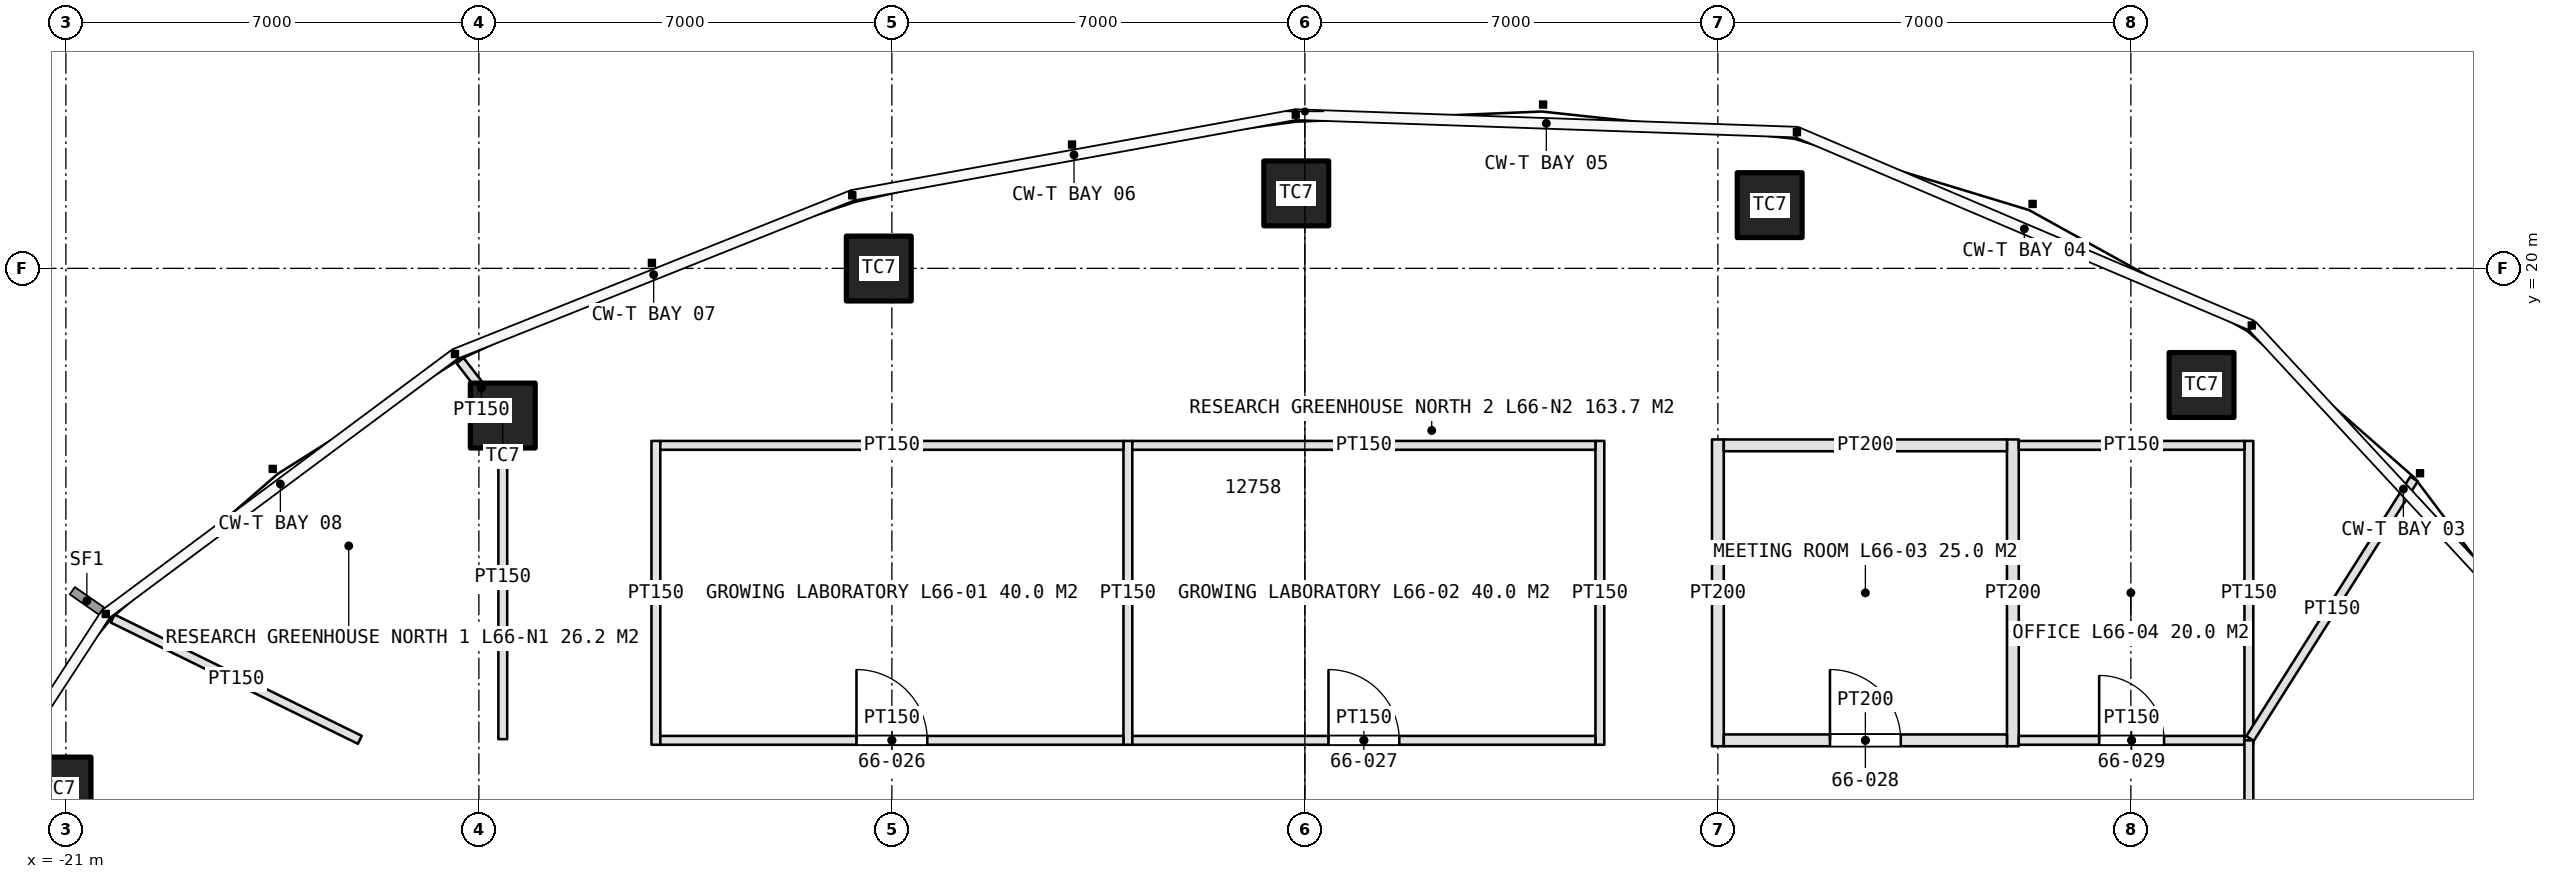
"""IFC4 building model, lengths in metres.
Left out: names, types, materials, properties, quantities, classifications, styles, units other than length and angle.
Written with IfcOpenShell. Run it as: python <this file> out.ifc"""

import sys

from ifc_helpers import new_model, si_unit, direction, frame, frame_2d, origin, origin_2d, place, context, subcontext, project, spatial, rectangle, extrude, element, fill, save


model = new_model("IFC4")
c1 = context("Model", 3, precision=1e-05, world=origin(), true_north=direction((0.0, 1.0)))
c2 = subcontext(c1, "Body", "Model", "MODEL_VIEW")
j1 = project(units=[si_unit("LENGTHUNIT", "METRE"), si_unit("PLANEANGLEUNIT", "RADIAN")], contexts=[c1])
p1 = place(None, origin())
s1 = spatial("IfcSite", under=j1, at=p1, CompositionType="ELEMENT")
p2 = place(p1, origin())
s2 = spatial("IfcBuilding", under=s1, at=p2, CompositionType="ELEMENT")
p3 = place(p2, frame((0.0, 0.0, 296.4)))
s3 = spatial("IfcBuildingStorey", under=s2, at=p3, CompositionType="ELEMENT", Elevation=296.4)
for number, where, z_axis, x_axis in (
    (1, (15.198, 18.023, 0.0), (0.0, 0.0, 1.0), (1.0, 0.0, 0.0)),
    (2, (7.878, 21.072, 0.0), (0.0, 0.0, 1.0), (1.0, 0.0, 0.0)),
    (3, (-0.146, 21.271, 0.0), (0.0, 0.0, 1.0), (1.0, 0.0, 0.0)),
    (4, (-7.222, 19.997, 0.0), (0.0, 0.0, 1.0), (1.0, 0.0, 0.0)),
    (5, (-13.595, 17.505, 0.0), (0.0, 0.0, 1.0), (1.0, 0.0, 0.0)),
    (6, (-21.125, 11.166, 0.0), (0.0, 0.0, 1.0), (1.0, 0.0, 0.0)),
):
    element("IfcColumn", number, at=place(p3, frame(where, z_axis=z_axis, x_axis=x_axis)), inside=s3, PredefinedType="COLUMN", context=c2, shape_type="SweptSolid", body=[
        extrude(rectangle(XDim=1.1, YDim=1.1, at=origin_2d()), origin(), (0.0, 0.0, 1.0), 4.2),
    ])
for number, where, z_axis, x_axis in (
    (7, (-11.0, 11.925, 0.0), (0.0, 0.0, 1.0), (0.0, 1.0, 0.0)),
    (8, (-3.0, 11.925, 0.0), (0.0, 0.0, 1.0), (0.0, 1.0, 0.0)),
    (9, (5.0, 11.925, 0.0), (0.0, 0.0, 1.0), (0.0, 1.0, 0.0)),
):
    element("IfcWall", number, at=place(p3, frame(where, z_axis=z_axis, x_axis=x_axis)), inside=s3, PredefinedType="PARTITIONING", context=c2, shape_type="SweptSolid", body=[
        extrude(rectangle(XDim=5.15, YDim=0.15, at=frame_2d((2.575, 0.0))), origin(), (0.0, 0.0, 1.0), 3.0),
    ])
p4 = place(p3, frame((-10.925, 12.0, 0.0), z_axis=(0.0, 0.0, 1.0), x_axis=(1.0, 0.0, 0.0)))
e10 = element("IfcWall", 10, at=p4, inside=s3, PredefinedType="PARTITIONING", context=c2, shape_type="SweptSolid", body=[
    extrude(rectangle(XDim=7.85, YDim=0.15, at=frame_2d((3.925, 0.0))), origin(), (0.0, 0.0, 1.0), 3.0),
])
p5 = place(p4, frame((3.325, 0.0, 0.0)))
e11 = element("IfcOpeningElement", 11, at=p5, cuts=e10, PredefinedType="OPENING", context=c2, shape_type="SweptSolid", body=[
    extrude(rectangle(XDim=1.2, YDim=2.3, at=frame_2d((0.6, 1.15))), frame((0.0, 0.085, 0.0), z_axis=(0.0, -1.0, 0.0), x_axis=(1.0, 0.0, 0.0)), (0.0, 0.0, 1.0), 0.17),
])
p6 = place(p3, frame((-10.925, 17.0, 0.0), z_axis=(0.0, 0.0, 1.0), x_axis=(1.0, 0.0, 0.0)))
e12 = element("IfcWall", 12, at=p6, inside=s3, PredefinedType="PARTITIONING", context=c2, shape_type="SweptSolid", body=[
    extrude(rectangle(XDim=7.85, YDim=0.15, at=frame_2d((3.925, 0.0))), origin(), (0.0, 0.0, 1.0), 3.0),
])
p7 = place(p3, frame((-2.925, 12.0, 0.0), z_axis=(0.0, 0.0, 1.0), x_axis=(1.0, 0.0, 0.0)))
e13 = element("IfcWall", 13, at=p7, inside=s3, PredefinedType="PARTITIONING", context=c2, shape_type="SweptSolid", body=[
    extrude(rectangle(XDim=7.85, YDim=0.15, at=frame_2d((3.925, 0.0))), origin(), (0.0, 0.0, 1.0), 3.0),
])
p8 = place(p7, frame((3.325, 0.0, 0.0)))
e14 = element("IfcOpeningElement", 14, at=p8, cuts=e13, PredefinedType="OPENING", context=c2, shape_type="SweptSolid", body=[
    extrude(rectangle(XDim=1.2, YDim=2.3, at=frame_2d((0.6, 1.15))), frame((0.0, 0.085, 0.0), z_axis=(0.0, -1.0, 0.0), x_axis=(1.0, 0.0, 0.0)), (0.0, 0.0, 1.0), 0.17),
])
p9 = place(p3, frame((-2.925, 17.0, 0.0), z_axis=(0.0, 0.0, 1.0), x_axis=(1.0, 0.0, 0.0)))
e15 = element("IfcWall", 15, at=p9, inside=s3, PredefinedType="PARTITIONING", context=c2, shape_type="SweptSolid", body=[
    extrude(rectangle(XDim=7.85, YDim=0.15, at=frame_2d((3.925, 0.0))), origin(), (0.0, 0.0, 1.0), 3.0),
])
for number, where, z_axis, x_axis in (
    (16, (7.0, 11.9, 0.0), (0.0, 0.0, 1.0), (0.0, 1.0, 0.0)),
    (17, (12.0, 11.9, 0.0), (0.0, 0.0, 1.0), (0.0, 1.0, 0.0)),
):
    element("IfcWall", number, at=place(p3, frame(where, z_axis=z_axis, x_axis=x_axis)), inside=s3, PredefinedType="PARTITIONING", context=c2, shape_type="SweptSolid", body=[
        extrude(rectangle(XDim=5.2, YDim=0.2, at=frame_2d((2.6, 0.0))), origin(), (0.0, 0.0, 1.0), 3.0),
    ])
p10 = place(p3, frame((16.0, 11.925, 0.0), z_axis=(0.0, 0.0, 1.0), x_axis=(0.0, 1.0, 0.0)))
e18 = element("IfcWall", 18, at=p10, inside=s3, PredefinedType="PARTITIONING", context=c2, shape_type="SweptSolid", body=[
    extrude(rectangle(XDim=5.15, YDim=0.15, at=frame_2d((2.575, 0.0))), origin(), (0.0, 0.0, 1.0), 3.0),
])
p11 = place(p3, frame((7.1, 12.0, 0.0), z_axis=(0.0, 0.0, 1.0), x_axis=(1.0, 0.0, 0.0)))
e19 = element("IfcWall", 19, at=p11, inside=s3, PredefinedType="PARTITIONING", context=c2, shape_type="SweptSolid", body=[
    extrude(rectangle(XDim=4.8, YDim=0.2, at=frame_2d((2.4, 0.0))), origin(), (0.0, 0.0, 1.0), 3.0),
])
p12 = place(p11, frame((1.8, 0.0, 0.0)))
e20 = element("IfcOpeningElement", 20, at=p12, cuts=e19, PredefinedType="OPENING", context=c2, shape_type="SweptSolid", body=[
    extrude(rectangle(XDim=1.2, YDim=2.4, at=frame_2d((0.6, 1.2))), frame((0.0, 0.11, 0.0), z_axis=(0.0, -1.0, 0.0), x_axis=(1.0, 0.0, 0.0)), (0.0, 0.0, 1.0), 0.22),
])
p13 = place(p3, frame((7.1, 17.0, 0.0), z_axis=(0.0, 0.0, 1.0), x_axis=(1.0, 0.0, 0.0)))
e21 = element("IfcWall", 21, at=p13, inside=s3, PredefinedType="PARTITIONING", context=c2, shape_type="SweptSolid", body=[
    extrude(rectangle(XDim=4.8, YDim=0.2, at=frame_2d((2.4, 0.0))), origin(), (0.0, 0.0, 1.0), 3.0),
])
p14 = place(p3, frame((12.1, 12.0, 0.0), z_axis=(0.0, 0.0, 1.0), x_axis=(1.0, 0.0, 0.0)))
e22 = element("IfcWall", 22, at=p14, inside=s3, PredefinedType="PARTITIONING", context=c2, shape_type="SweptSolid", body=[
    extrude(rectangle(XDim=3.825, YDim=0.15, at=frame_2d((1.913, 0.0))), origin(), (0.0, 0.0, 1.0), 3.0),
])
p15 = place(p14, frame((1.363, 0.0, 0.0)))
e23 = element("IfcOpeningElement", 23, at=p15, cuts=e22, PredefinedType="OPENING", context=c2, shape_type="SweptSolid", body=[
    extrude(rectangle(XDim=1.1, YDim=2.3, at=frame_2d((0.55, 1.15))), frame((0.0, 0.085, 0.0), z_axis=(0.0, -1.0, 0.0), x_axis=(1.0, 0.0, 0.0)), (0.0, 0.0, 1.0), 0.17),
])
p16 = place(p3, frame((12.1, 17.0, 0.0), z_axis=(0.0, 0.0, 1.0), x_axis=(1.0, 0.0, 0.0)))
e24 = element("IfcWall", 24, at=p16, inside=s3, PredefinedType="PARTITIONING", context=c2, shape_type="SweptSolid", body=[
    extrude(rectangle(XDim=3.825, YDim=0.15, at=frame_2d((1.913, 0.0))), origin(), (0.0, 0.0, 1.0), 3.0),
])
p17 = place(p3, frame((-16.018, 12.009, 0.0), z_axis=(0.0, 0.0, 1.0), x_axis=(-0.897771840996, 0.440460805879, 0.0)))
e25 = element("IfcWall", 25, at=p17, inside=s3, PredefinedType="PARTITIONING", context=c2, shape_type="SweptSolid", body=[
    extrude(rectangle(XDim=4.666, YDim=0.15, at=frame_2d((2.333, 0.0))), origin(), (0.0, 0.0, 1.0), 3.0),
])
p18 = place(p3, frame((16.02, 12.032, 0.0), z_axis=(0.0, 0.0, 1.0), x_axis=(0.534176584227, 0.845372921771, 0.0)))
e26 = element("IfcWall", 26, at=p18, inside=s3, PredefinedType="PARTITIONING", context=c2, shape_type="SweptSolid", body=[
    extrude(rectangle(XDim=5.203, YDim=0.15, at=frame_2d((2.602, 0.0))), origin(), (0.0, 0.0, 1.0), 3.0),
])
p19 = place(p3, frame((-13.595, 12.02, 0.0), z_axis=(0.0, 0.0, 1.0), x_axis=(0.0, 1.0, 0.0)))
e27 = element("IfcWall", 27, at=p19, inside=s3, PredefinedType="PARTITIONING", context=c2, shape_type="SweptSolid", body=[
    extrude(rectangle(XDim=5.485, YDim=0.15, at=frame_2d((2.742, 0.0))), origin(), (0.0, 0.0, 1.0), 3.0),
])
p20 = place(p3, frame((-13.595, 17.505, 0.0), z_axis=(0.0, 0.0, 1.0), x_axis=(-0.61332442804, 0.789831086986, 0.0)))
e28 = element("IfcWall", 28, at=p20, inside=s3, PredefinedType="PARTITIONING", context=c2, shape_type="SweptSolid", body=[
    extrude(rectangle(XDim=1.18, YDim=0.15, at=frame_2d((0.59, 0.0))), origin(), (0.0, 0.0, 1.0), 3.0),
])
p21 = place(p3, frame((16.0, 6.0, 0.0), z_axis=(0.0, 0.0, 1.0), x_axis=(0.0, 1.0, 0.0)))
e29 = element("IfcWall", 29, at=p21, inside=s3, PredefinedType="PARTITIONING", context=c2, shape_type="SweptSolid", body=[
    extrude(rectangle(XDim=6.0, YDim=0.15, at=frame_2d((3.0, 0.0))), origin(), (0.0, 0.0, 1.0), 3.0),
])
p22 = place(p5, origin())
e30 = element("IfcDoor", 30, at=p22, inside=s3, OperationType="SINGLE_SWING_LEFT", PredefinedType="DOOR", context=c2, shape_type="SweptSolid", body=[
    extrude(rectangle(XDim=1.2, YDim=2.3, at=frame_2d((0.6, 1.15))), frame((0.0, 0.025, 0.0), z_axis=(0.0, -1.0, 0.0), x_axis=(1.0, 0.0, 0.0)), (0.0, 0.0, 1.0), 0.05),
])
fill(e11, e30)
p23 = place(p8, origin())
e31 = element("IfcDoor", 31, at=p23, inside=s3, OperationType="SINGLE_SWING_LEFT", PredefinedType="DOOR", context=c2, shape_type="SweptSolid", body=[
    extrude(rectangle(XDim=1.2, YDim=2.3, at=frame_2d((0.6, 1.15))), frame((0.0, 0.025, 0.0), z_axis=(0.0, -1.0, 0.0), x_axis=(1.0, 0.0, 0.0)), (0.0, 0.0, 1.0), 0.05),
])
fill(e14, e31)
p24 = place(p12, origin())
e32 = element("IfcDoor", 32, at=p24, inside=s3, OperationType="SINGLE_SWING_LEFT", PredefinedType="DOOR", context=c2, shape_type="SweptSolid", body=[
    extrude(rectangle(XDim=1.2, YDim=2.4, at=frame_2d((0.6, 1.2))), frame((0.0, 0.025, 0.0), z_axis=(0.0, -1.0, 0.0), x_axis=(1.0, 0.0, 0.0)), (0.0, 0.0, 1.0), 0.05),
])
fill(e20, e32)
p25 = place(p15, origin())
e33 = element("IfcDoor", 33, at=p25, inside=s3, OperationType="SINGLE_SWING_LEFT", PredefinedType="DOOR", context=c2, shape_type="SweptSolid", body=[
    extrude(rectangle(XDim=1.1, YDim=2.3, at=frame_2d((0.55, 1.15))), frame((0.0, 0.025, 0.0), z_axis=(0.0, -1.0, 0.0), x_axis=(1.0, 0.0, 0.0)), (0.0, 0.0, 1.0), 0.05),
])
fill(e23, e33)
save(model, sys.argv[1])
